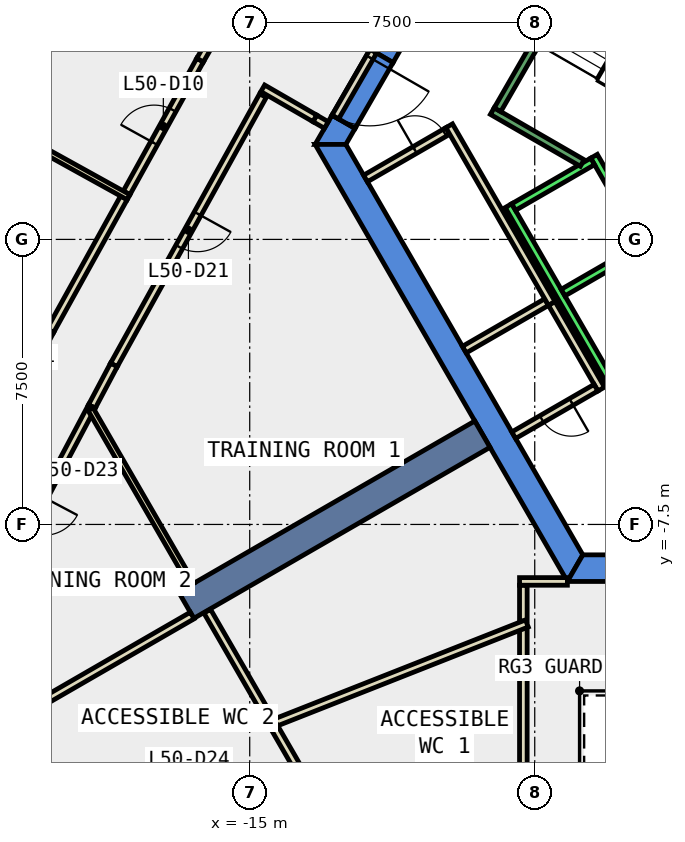
"""IFC4 building model, lengths in metres.
Left out: names, types, materials, properties, quantities, classifications, styles, units other than length and angle.
Written with IfcOpenShell. Run it as: python <this file> out.ifc"""

import sys

from ifc_helpers import new_model, si_unit, direction, frame, frame_2d, origin, place, context, subcontext, project, spatial, polyline, rectangle, outline, extrude, element, fill, save


model = new_model("IFC4")
c1 = context("Model", 3, precision=1e-05, world=origin(), true_north=direction((0.0, 1.0)))
c2 = subcontext(c1, "Body", "Model", "MODEL_VIEW")
j1 = project(units=[si_unit("LENGTHUNIT", "METRE"), si_unit("PLANEANGLEUNIT", "RADIAN")], contexts=[c1])
p1 = place(None, origin())
s1 = spatial("IfcSite", under=j1, at=p1, CompositionType="ELEMENT")
p2 = place(p1, origin())
s2 = spatial("IfcBuilding", under=s1, at=p2, CompositionType="ELEMENT")
p3 = place(p2, frame((0.0, 0.0, 223.4)))
s3 = spatial("IfcBuildingStorey", under=s2, at=p3, CompositionType="ELEMENT", Elevation=223.4)
p4 = place(p3, frame((0.0, 0.0, -0.4)))
e1 = element("IfcWall", 1, at=p4, inside=s3, PredefinedType="SHEAR", context=c2, shape_type="SweptSolid", body=[
    extrude(outline(polyline([(-11.834, 5.002), (-11.228, 4.652), (-6.235, 13.3), (-6.64, 14.0), (-11.834, 5.002)])), origin(), (0.0, 0.0, 1.0), 4.2),
])
p5 = place(p3, frame((0.0, 0.0, -0.4)))
e2 = element("IfcWall", 2, at=p5, inside=s3, PredefinedType="SHEAR", context=c2, shape_type="SweptSolid", body=[
    extrude(outline(polyline([(-12.228, 2.92), (-12.834, 3.27), (-13.279, 2.5), (-12.471, 2.5), (-12.228, 2.92)])), origin(), (0.0, 0.0, 1.0), 4.2),
])
p6 = place(p3, frame((0.0, 0.0, 3.6)))
e3 = element("IfcWall", 3, at=p6, inside=s3, PredefinedType="SHEAR", context=c2, shape_type="SweptSolid", body=[
    extrude(outline(polyline([(-12.834, 3.27), (-12.228, 2.92), (-11.228, 4.652), (-11.834, 5.002), (-12.834, 3.27)])), origin(), (0.0, 0.0, 1.0), 0.2),
])
p7 = place(p3, frame((0.0, 0.0, -0.4)))
e4 = element("IfcWall", 4, at=p7, inside=s3, PredefinedType="SHEAR", context=c2, shape_type="SweptSolid", body=[
    extrude(outline(polyline([(-13.279, 2.5), (-6.64, -9.0), (-6.235, -8.3), (-12.471, 2.5), (-13.279, 2.5)])), origin(), (0.0, 0.0, 1.0), 4.2),
])
p8 = place(p3, frame((0.0, 0.0, -0.4)))
e5 = element("IfcWall", 5, at=p8, inside=s3, PredefinedType="SHEAR", context=c2, shape_type="SweptSolid", body=[
    extrude(outline(polyline([(3.75, -9.0), (3.75, -8.3), (-6.235, -8.3), (-6.64, -9.0), (3.75, -9.0)])), origin(), (0.0, 0.0, 1.0), 4.2),
])
p9 = place(p3, frame((-8.877, -5.125, -0.4), z_axis=(0.0, 0.0, 1.0), x_axis=(-0.866017533419, -0.500013631625, 0.0)))
e6 = element("IfcWall", 6, at=p9, inside=s3, PredefinedType="SHEAR", context=c2, shape_type="SweptSolid", body=[
    extrude(rectangle(XDim=9.0, YDim=0.8, at=frame_2d((4.5, 0.0))), origin(), (0.0, 0.0, 1.0), 4.2),
])
p10 = place(p3, frame((-12.984, 3.01, 0.0), z_axis=(0.0, 0.0, 1.0), x_axis=(-0.866046247233, 0.49996389635, 0.0)))
e7 = element("IfcWall", 7, at=p10, inside=s3, PredefinedType="PARTITIONING", context=c2, shape_type="SweptSolid", body=[
    extrude(rectangle(XDim=0.35, YDim=0.2, at=frame_2d((0.175, 0.0))), origin(), (0.0, 0.0, 1.0), 2.4),
])
p11 = place(p3, frame((-14.652, 3.783, 0.0), z_axis=(0.0, 0.0, 1.0), x_axis=(-0.484249955458, -0.874929700398, 0.0)))
e8 = element("IfcWall", 8, at=p11, inside=s3, PredefinedType="PARTITIONING", context=c2, shape_type="SweptSolid", body=[
    extrude(rectangle(XDim=8.099, YDim=0.2, at=frame_2d((4.049, 0.0))), origin(), (0.0, 0.0, 1.0), 3.8),
])
p12 = place(p11, frame((3.55, 0.0, 0.0)))
e9 = element("IfcOpeningElement", 9, at=p12, cuts=e8, PredefinedType="OPENING", context=c2, shape_type="SweptSolid", body=[
    extrude(rectangle(XDim=1.0, YDim=2.1, at=frame_2d((0.5, 1.05))), frame((0.0, 0.11, 0.0), z_axis=(0.0, -1.0, 0.0), x_axis=(1.0, 0.0, 0.0)), (0.0, 0.0, 1.0), 0.22),
])
p13 = place(p3, frame((-18.574, -3.303, 0.0), z_axis=(0.0, 0.0, 1.0), x_axis=(-0.468458328651, -0.883485593724, 0.0)))
e10 = element("IfcWall", 10, at=p13, inside=s3, PredefinedType="PARTITIONING", context=c2, shape_type="SweptSolid", body=[
    extrude(rectangle(XDim=1.238, YDim=0.2, at=frame_2d((0.619, 0.0))), origin(), (0.0, 0.0, 1.0), 3.8),
])
p14 = place(p3, frame((-19.154, -4.397, 0.0), z_axis=(0.0, 0.0, 1.0), x_axis=(-0.468118749105, -0.883665568378, 0.0)))
e11 = element("IfcWall", 11, at=p14, inside=s3, PredefinedType="PARTITIONING", context=c2, shape_type="SweptSolid", body=[
    extrude(rectangle(XDim=6.409, YDim=0.2, at=frame_2d((3.204, 0.0))), origin(), (0.0, 0.0, 1.0), 3.8),
])
p15 = place(p14, frame((2.704, 0.0, 0.0)))
e12 = element("IfcOpeningElement", 12, at=p15, cuts=e11, PredefinedType="OPENING", context=c2, shape_type="SweptSolid", body=[
    extrude(rectangle(XDim=1.0, YDim=2.1, at=frame_2d((0.5, 1.05))), frame((0.0, 0.11, 0.0), z_axis=(0.0, -1.0, 0.0), x_axis=(1.0, 0.0, 0.0)), (0.0, 0.0, 1.0), 0.22),
])
p16 = place(p3, frame((-18.24, 1.225, 0.0), z_axis=(0.0, 0.0, 1.0), x_axis=(0.484411997038, 0.874839995156, 0.0)))
e13 = element("IfcWall", 13, at=p16, inside=s3, PredefinedType="PARTITIONING", context=c2, shape_type="SweptSolid", body=[
    extrude(rectangle(XDim=3.993, YDim=0.2, at=frame_2d((1.996, 0.0))), origin(), (0.0, 0.0, 1.0), 3.8),
])
p17 = place(p16, frame((1.496, 0.0, 0.0)))
e14 = element("IfcOpeningElement", 14, at=p17, cuts=e13, PredefinedType="OPENING", context=c2, shape_type="SweptSolid", body=[
    extrude(rectangle(XDim=1.0, YDim=2.1, at=frame_2d((0.5, 1.05))), frame((0.0, 0.11, 0.0), z_axis=(0.0, -1.0, 0.0), x_axis=(1.0, 0.0, 0.0)), (0.0, 0.0, 1.0), 0.22),
])
p18 = place(p3, frame((-16.306, 4.718, 0.0), z_axis=(0.0, 0.0, 1.0), x_axis=(0.499803646539, 0.866138738832, 0.0)))
e15 = element("IfcWall", 15, at=p18, inside=s3, PredefinedType="PARTITIONING", context=c2, shape_type="SweptSolid", body=[
    extrude(rectangle(XDim=3.991, YDim=0.2, at=frame_2d((1.996, 0.0))), origin(), (0.0, 0.0, 1.0), 3.8),
])
p19 = place(p3, frame((-22.14, -5.976, 0.0), z_axis=(0.0, 0.0, 1.0), x_axis=(0.467979143965, 0.883739509592, 0.0)))
e16 = element("IfcWall", 16, at=p19, inside=s3, PredefinedType="PARTITIONING", context=c2, shape_type="SweptSolid", body=[
    extrude(rectangle(XDim=4.049, YDim=0.2, at=frame_2d((2.024, 0.0))), origin(), (0.0, 0.0, 1.0), 3.8),
])
p20 = place(p19, frame((1.524, 0.0, 0.0)))
e17 = element("IfcOpeningElement", 17, at=p20, cuts=e16, PredefinedType="OPENING", context=c2, shape_type="SweptSolid", body=[
    extrude(rectangle(XDim=1.0, YDim=2.1, at=frame_2d((0.5, 1.05))), frame((0.0, 0.11, 0.0), z_axis=(0.0, -1.0, 0.0), x_axis=(1.0, 0.0, 0.0)), (0.0, 0.0, 1.0), 0.22),
])
p21 = place(p3, frame((-20.245, -2.398, 0.0), z_axis=(0.0, 0.0, 1.0), x_axis=(0.484328424129, 0.874886265511, 0.0)))
e18 = element("IfcWall", 18, at=p21, inside=s3, PredefinedType="PARTITIONING", context=c2, shape_type="SweptSolid", body=[
    extrude(rectangle(XDim=3.991, YDim=0.2, at=frame_2d((1.996, 0.0))), origin(), (0.0, 0.0, 1.0), 3.8),
])
p22 = place(p3, frame((-7.188, -1.65, 0.0), z_axis=(0.0, 0.0, 1.0), x_axis=(-0.866022959057, -0.500004234368, 0.0)))
e19 = element("IfcWall", 19, at=p22, inside=s3, PredefinedType="PARTITIONING", context=c2, shape_type="SweptSolid", body=[
    extrude(rectangle(XDim=2.5, YDim=0.2, at=frame_2d((1.25, 0.0))), origin(), (0.0, 0.0, 1.0), 3.8),
])
p23 = place(p3, frame((-11.953, 1.603, 0.0), z_axis=(0.0, 0.0, 1.0), x_axis=(0.865998541277, 0.500046524342, 0.0)))
e20 = element("IfcWall", 20, at=p23, inside=s3, PredefinedType="PARTITIONING", context=c2, shape_type="SweptSolid", body=[
    extrude(rectangle(XDim=2.5, YDim=0.2, at=frame_2d((1.25, 0.0))), origin(), (0.0, 0.0, 1.0), 3.8),
])
p24 = place(p23, frame((1.5, 0.0, 0.0)))
e21 = element("IfcOpeningElement", 21, at=p24, cuts=e20, PredefinedType="OPENING", context=c2, shape_type="SweptSolid", body=[
    extrude(rectangle(XDim=0.9, YDim=2.1, at=frame_2d((0.45, 1.05))), frame((0.0, 0.11, 0.0), z_axis=(0.0, -1.0, 0.0), x_axis=(1.0, 0.0, 0.0)), (0.0, 0.0, 1.0), 0.22),
])
p25 = place(p3, frame((-9.751, 2.99, 0.0), z_axis=(0.0, 0.0, 1.0), x_axis=(0.499955951776, -0.866050833545, 0.0)))
e22 = element("IfcWall", 22, at=p25, inside=s3, PredefinedType="PARTITIONING", context=c2, shape_type="SweptSolid", body=[
    extrude(rectangle(XDim=5.4, YDim=0.2, at=frame_2d((2.7, 0.0))), origin(), (0.0, 0.0, 1.0), 3.8),
])
p26 = place(p3, frame((-7.051, -1.687, 0.0), z_axis=(0.0, 0.0, 1.0), x_axis=(0.500128937424, -0.865950948929, 0.0)))
e23 = element("IfcWall", 23, at=p26, inside=s3, PredefinedType="PARTITIONING", context=c2, shape_type="SweptSolid", body=[
    extrude(rectangle(XDim=2.599, YDim=0.2, at=frame_2d((1.3, 0.0))), origin(), (0.0, 0.0, 1.0), 3.8),
])
p27 = place(p3, frame((-5.888, -3.902, 0.0), z_axis=(0.0, 0.0, 1.0), x_axis=(-0.866022959057, -0.500004234368, 0.0)))
e24 = element("IfcWall", 24, at=p27, inside=s3, PredefinedType="PARTITIONING", context=c2, shape_type="SweptSolid", body=[
    extrude(rectangle(XDim=2.5, YDim=0.2, at=frame_2d((1.25, 0.0))), origin(), (0.0, 0.0, 1.0), 3.8),
])
p28 = place(p27, frame((0.75, 0.0, 0.0)))
e25 = element("IfcOpeningElement", 25, at=p28, cuts=e24, PredefinedType="OPENING", context=c2, shape_type="SweptSolid", body=[
    extrude(rectangle(XDim=0.9, YDim=2.1, at=frame_2d((0.45, 1.05))), frame((0.0, 0.11, 0.0), z_axis=(0.0, -1.0, 0.0), x_axis=(1.0, 0.0, 0.0)), (0.0, 0.0, 1.0), 0.22),
])
p29 = place(p3, frame((-7.8, -10.041, 0.0), z_axis=(0.0, 0.0, 1.0), x_axis=(0.0, 1.0, 0.0)))
e26 = element("IfcWall", 26, at=p29, inside=s3, PredefinedType="PARTITIONING", context=c2, shape_type="SweptSolid", body=[
    extrude(rectangle(XDim=0.942, YDim=0.2, at=frame_2d((0.471, 0.0))), origin(), (0.0, 0.0, 1.0), 3.8),
])
p30 = place(p3, frame((-7.9, -8.999, 0.0), z_axis=(0.0, 0.0, 1.0), x_axis=(1.0, 0.0, 0.0)))
e27 = element("IfcWall", 27, at=p30, inside=s3, PredefinedType="PARTITIONING", context=c2, shape_type="SweptSolid", body=[
    extrude(rectangle(XDim=1.259, YDim=0.2, at=frame_2d((0.629, 0.0))), origin(), (0.0, 0.0, 1.0), 3.8),
])
p31 = place(p3, frame((-7.8, -14.959, 0.0), z_axis=(0.0, 0.0, 1.0), x_axis=(0.0, 1.0, 0.0)))
e28 = element("IfcWall", 28, at=p31, inside=s3, PredefinedType="PARTITIONING", context=c2, shape_type="SweptSolid", body=[
    extrude(rectangle(XDim=4.718, YDim=0.2, at=frame_2d((2.359, 0.0))), origin(), (0.0, 0.0, 1.0), 3.8),
])
p32 = place(p3, frame((-7.707, -10.105, 0.0), z_axis=(0.0, 0.0, 1.0), x_axis=(-0.930316800812, -0.36675693603, 0.0)))
e29 = element("IfcWall", 29, at=p32, inside=s3, PredefinedType="PARTITIONING", context=c2, shape_type="SweptSolid", body=[
    extrude(rectangle(XDim=7.302, YDim=0.2, at=frame_2d((3.651, 0.0))), origin(), (0.0, 0.0, 1.0), 3.8),
])
p33 = place(p3, frame((-16.525, -9.079, 0.0), z_axis=(0.0, 0.0, 1.0), x_axis=(-0.499943228252, 0.866058178487, 0.0)))
e30 = element("IfcWall", 30, at=p33, inside=s3, PredefinedType="PARTITIONING", context=c2, shape_type="SweptSolid", body=[
    extrude(rectangle(XDim=5.329, YDim=0.15, at=frame_2d((2.664, 0.0))), origin(), (0.0, 0.0, 1.0), 3.8),
])
p34 = place(p3, frame((-14.457, -12.66, 0.0), z_axis=(0.0, 0.0, 1.0), x_axis=(-0.49997268395, 0.866041174139, 0.0)))
e31 = element("IfcWall", 31, at=p34, inside=s3, PredefinedType="PARTITIONING", context=c2, shape_type="SweptSolid", body=[
    extrude(rectangle(XDim=3.322, YDim=0.2, at=frame_2d((1.661, 0.0))), origin(), (0.0, 0.0, 1.0), 3.8),
])
p35 = place(p3, frame((-13.146, -14.93, 0.0), z_axis=(0.0, 0.0, 1.0), x_axis=(-0.500086091327, 0.865975693228, 0.0)))
e32 = element("IfcWall", 32, at=p35, inside=s3, PredefinedType="PARTITIONING", context=c2, shape_type="SweptSolid", body=[
    extrude(rectangle(XDim=2.421, YDim=0.2, at=frame_2d((1.211, 0.0))), origin(), (0.0, 0.0, 1.0), 3.8),
])
p36 = place(p3, frame((-16.514, -9.897, 0.0), z_axis=(0.0, 0.0, 1.0), x_axis=(-0.866041209536, -0.499972622635, 0.0)))
e33 = element("IfcWall", 33, at=p36, inside=s3, PredefinedType="PARTITIONING", context=c2, shape_type="SweptSolid", body=[
    extrude(rectangle(XDim=6.843, YDim=0.2, at=frame_2d((3.421, 0.0))), origin(), (0.0, 0.0, 1.0), 3.8),
])
p37 = place(p3, frame((-18.189, 1.111, 0.0), z_axis=(0.0, 0.0, 1.0), x_axis=(-0.874928335558, 0.484252421405, 0.0)))
e34 = element("IfcWall", 34, at=p37, inside=s3, PredefinedType="PARTITIONING", context=c2, shape_type="SweptSolid", body=[
    extrude(rectangle(XDim=6.1, YDim=0.15, at=frame_2d((3.05, 0.0))), origin(), (0.0, 0.0, 1.0), 3.8),
])
p38 = place(p3, frame((-11.747, 4.952, 0.0), z_axis=(0.0, 0.0, 1.0), x_axis=(-0.50002537861, -0.866010750942, 0.0)))
e35 = element("IfcWall", 35, at=p38, inside=s3, PredefinedType="PARTITIONING", context=c2, shape_type="SweptSolid", body=[
    extrude(rectangle(XDim=2.0, YDim=0.2, at=frame_2d((1.0, 0.0))), origin(), (0.0, 0.0, 1.0), 2.4),
])
p39 = place(p38, frame((0.19, 0.0, 0.0)))
e36 = element("IfcOpeningElement", 36, at=p39, cuts=e35, PredefinedType="OPENING", context=c2, shape_type="SweptSolid", body=[
    extrude(rectangle(XDim=1.8, YDim=2.1, at=frame_2d((0.9, 1.05))), frame((0.0, 0.11, 0.0), z_axis=(0.0, -1.0, 0.0), x_axis=(1.0, 0.0, 0.0)), (0.0, 0.0, 1.0), 0.22),
])
p40 = place(p3, frame((-13.287, 3.185, 0.0), z_axis=(0.0, 0.0, 1.0), x_axis=(-0.865992812752, 0.500056445075, 0.0)))
e37 = element("IfcWall", 37, at=p40, inside=s3, PredefinedType="PARTITIONING", context=c2, shape_type="SweptSolid", body=[
    extrude(rectangle(XDim=1.582, YDim=0.2, at=frame_2d((0.791, 0.0))), origin(), (0.0, 0.0, 1.0), 3.8),
])
p41 = place(p3, frame((-5.94, 2.188, 0.0), z_axis=(0.0, 0.0, 1.0), x_axis=(0.500034260056, -0.866005622828, 0.0)))
e38 = element("IfcWall", 38, at=p41, inside=s3, PredefinedType="STANDARD", context=c2, shape_type="SweptSolid", body=[
    extrude(rectangle(XDim=5.399, YDim=0.2, at=frame_2d((2.7, 0.0))), origin(), (0.0, 0.0, 1.0), 3.8),
])
p42 = place(p41, frame((3.075, 0.0, 0.0)))
e39 = element("IfcOpeningElement", 39, at=p42, cuts=e38, PredefinedType="OPENING", context=c2, shape_type="SweptSolid", body=[
    extrude(rectangle(XDim=1.1, YDim=2.1, at=frame_2d((0.55, 1.05))), frame((0.0, 0.11, 0.0), z_axis=(0.0, -1.0, 0.0), x_axis=(1.0, 0.0, 0.0)), (0.0, 0.0, 1.0), 0.22),
])
p43 = place(p41, frame((1.225, 0.0, 0.0)))
e40 = element("IfcOpeningElement", 40, at=p43, cuts=e38, PredefinedType="OPENING", context=c2, shape_type="SweptSolid", body=[
    extrude(rectangle(XDim=1.1, YDim=2.1, at=frame_2d((0.55, 1.05))), frame((0.0, 0.11, 0.0), z_axis=(0.0, -1.0, 0.0), x_axis=(1.0, 0.0, 0.0)), (0.0, 0.0, 1.0), 0.22),
])
p44 = place(p3, frame((-8.192, 0.888, 0.0), z_axis=(0.0, 0.0, 1.0), x_axis=(0.500034260056, -0.866005622828, 0.0)))
e41 = element("IfcWall", 41, at=p44, inside=s3, PredefinedType="STANDARD", context=c2, shape_type="SweptSolid", body=[
    extrude(rectangle(XDim=5.399, YDim=0.2, at=frame_2d((2.7, 0.0))), origin(), (0.0, 0.0, 1.0), 3.8),
])
for number, where, z_axis, x_axis in (
    (42, (-5.977, 2.052, 0.0), (0.0, 0.0, 1.0), (-0.866, -0.5, 0.0)),
    (43, (-4.677, -0.2, 0.0), (0.0, 0.0, 1.0), (-0.866, -0.5, 0.0)),
):
    element("IfcWall", number, at=place(p3, frame(where, z_axis=z_axis, x_axis=x_axis)), inside=s3, PredefinedType="STANDARD", context=c2, shape_type="SweptSolid", body=[
        extrude(rectangle(XDim=2.399, YDim=0.2, at=frame_2d((1.2, 0.0))), origin(), (0.0, 0.0, 1.0), 3.8),
    ])
p45 = place(p3, frame((-6.25, 2.01, 0.0), z_axis=(0.0, 0.0, 1.0), x_axis=(-0.86611865017, 0.499838457731, 0.0)))
e44 = element("IfcWall", 44, at=p45, inside=s3, PredefinedType="STANDARD", context=c2, shape_type="SweptSolid", body=[
    extrude(rectangle(XDim=2.733, YDim=0.2, at=frame_2d((1.366, 0.0))), origin(), (0.0, 0.0, 1.0), 3.8),
])
p46 = place(p3, frame((-5.03, 9.388, 0.0), z_axis=(0.0, 0.0, 1.0), x_axis=(-0.499978703459, -0.866037698999, 0.0)))
e45 = element("IfcWall", 45, at=p46, inside=s3, PredefinedType="STANDARD", context=c2, shape_type="SweptSolid", body=[
    extrude(rectangle(XDim=6.9, YDim=0.2, at=frame_2d((3.45, 0.0))), origin(), (0.0, 0.0, 1.0), 3.8),
])
p47 = place(p17, origin())
e46 = element("IfcDoor", 46, at=p47, inside=s3, OperationType="SINGLE_SWING_LEFT", PredefinedType="DOOR", context=c2, shape_type="SweptSolid", body=[
    extrude(rectangle(XDim=1.0, YDim=2.1, at=frame_2d((0.5, 1.05))), frame((0.0, 0.025, 0.0), z_axis=(0.0, -1.0, 0.0), x_axis=(1.0, 0.0, 0.0)), (0.0, 0.0, 1.0), 0.05),
])
fill(e14, e46)
p48 = place(p12, origin())
e47 = element("IfcDoor", 47, at=p48, inside=s3, OperationType="SINGLE_SWING_LEFT", PredefinedType="DOOR", context=c2, shape_type="SweptSolid", body=[
    extrude(rectangle(XDim=1.0, YDim=2.1, at=frame_2d((0.5, 1.05))), frame((0.0, 0.025, 0.0), z_axis=(0.0, -1.0, 0.0), x_axis=(1.0, 0.0, 0.0)), (0.0, 0.0, 1.0), 0.05),
])
fill(e9, e47)
p49 = place(p24, origin())
e48 = element("IfcDoor", 48, at=p49, inside=s3, OperationType="SINGLE_SWING_LEFT", PredefinedType="DOOR", context=c2, shape_type="SweptSolid", body=[
    extrude(rectangle(XDim=0.9, YDim=2.1, at=frame_2d((0.45, 1.05))), frame((0.0, 0.025, 0.0), z_axis=(0.0, -1.0, 0.0), x_axis=(1.0, 0.0, 0.0)), (0.0, 0.0, 1.0), 0.05),
])
fill(e21, e48)
p50 = place(p28, origin())
e49 = element("IfcDoor", 49, at=p50, inside=s3, OperationType="SINGLE_SWING_RIGHT", PredefinedType="DOOR", context=c2, shape_type="SweptSolid", body=[
    extrude(rectangle(XDim=0.9, YDim=2.1, at=frame_2d((0.45, 1.05))), frame((0.0, 0.025, 0.0), z_axis=(0.0, -1.0, 0.0), x_axis=(1.0, 0.0, 0.0)), (0.0, 0.0, 1.0), 0.05),
])
fill(e25, e49)
p51 = place(p39, origin())
e50 = element("IfcDoor", 50, at=p51, inside=s3, OperationType="DOUBLE_DOOR_SINGLE_SWING", PredefinedType="DOOR", context=c2, shape_type="SweptSolid", body=[
    extrude(rectangle(XDim=1.8, YDim=2.1, at=frame_2d((0.9, 1.05))), frame((0.0, 0.025, 0.0), z_axis=(0.0, -1.0, 0.0), x_axis=(1.0, 0.0, 0.0)), (0.0, 0.0, 1.0), 0.05),
])
fill(e36, e50)
save(model, sys.argv[1])
